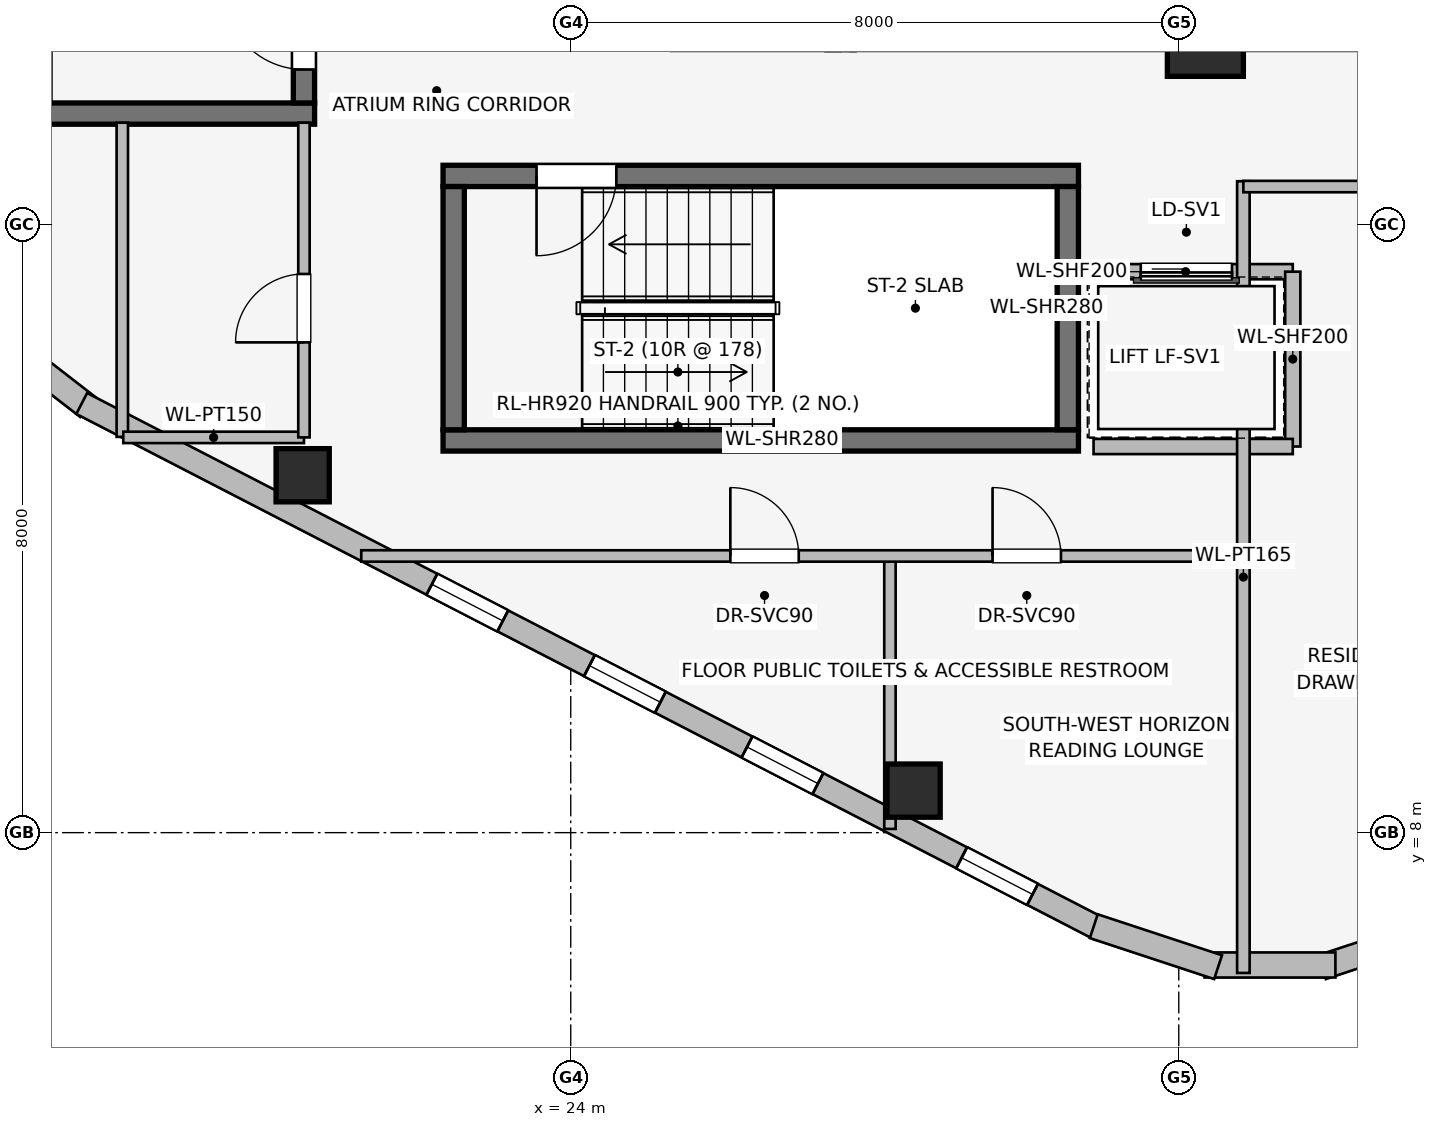
"""IFC4 building model, lengths in metres.
Left out: names, types, materials, properties, quantities, classifications, styles, units other than length and angle.
Written with IfcOpenShell. Run it as: python <this file> out.ifc"""

import sys

from ifc_helpers import new_model, si_unit, direction, frame, frame_2d, origin, origin_2d, place, context, subcontext, project, spatial, rectangle, extrude, element, fill, save


model = new_model("IFC4")
c1 = context("Model", 3, precision=1e-05, world=origin(), true_north=direction((0.0, 1.0)))
c2 = subcontext(c1, "Body", "Model", "MODEL_VIEW")
j1 = project(units=[si_unit("LENGTHUNIT", "METRE"), si_unit("PLANEANGLEUNIT", "RADIAN")], contexts=[c1])
p1 = place(None, origin())
s1 = spatial("IfcSite", under=j1, at=p1, CompositionType="ELEMENT")
p2 = place(p1, origin())
s2 = spatial("IfcBuilding", under=s1, at=p2, CompositionType="ELEMENT")
p3 = place(p2, frame((0.0, 0.0, 249.0)))
s3 = spatial("IfcBuildingStorey", under=s2, at=p3, CompositionType="ELEMENT", Elevation=249.0)
p4 = place(p3, frame((16.87, 17.46, 0.0), z_axis=(0.0, 0.0, 1.0), x_axis=(1.0, 0.0, 0.0)))
e1 = element("IfcWall", 1, at=p4, inside=s3, PredefinedType="SHEAR", context=c2, shape_type="SweptSolid", body=[
    extrude(rectangle(XDim=3.76, YDim=0.28, at=frame_2d((1.88, 0.0))), origin(), (0.0, 0.0, 1.0), 3.55),
])
p5 = place(p3, frame((20.49, 17.6, 0.0), z_axis=(0.0, 0.0, 1.0), x_axis=(0.0, 1.0, 0.0)))
e2 = element("IfcWall", 2, at=p5, inside=s3, PredefinedType="SHEAR", context=c2, shape_type="SweptSolid", body=[
    extrude(rectangle(XDim=7.8, YDim=0.28, at=frame_2d((3.9, 0.0))), origin(), (0.0, 0.0, 1.0), 3.55),
])
p6 = place(p5, frame((0.44, 0.0, 0.0)))
e3 = element("IfcOpeningElement", 3, at=p6, cuts=e2, PredefinedType="OPENING", context=c2, shape_type="SweptSolid", body=[
    extrude(rectangle(XDim=1.05, YDim=2.0, at=frame_2d((0.525, 1.0))), frame((0.0, 0.15, 0.0), z_axis=(0.0, -1.0, 0.0), x_axis=(1.0, 0.0, 0.0)), (0.0, 0.0, 1.0), 0.3),
])
p7 = place(p3, frame((22.32, 13.16, 0.0), z_axis=(0.0, 0.0, 1.0), x_axis=(1.0, 0.0, 0.0)))
e4 = element("IfcWall", 4, at=p7, inside=s3, PredefinedType="SHEAR", context=c2, shape_type="SweptSolid", body=[
    extrude(rectangle(XDim=8.36, YDim=0.28, at=frame_2d((4.18, 0.0))), origin(), (0.0, 0.0, 1.0), 3.55),
])
p8 = place(p3, frame((30.68, 16.64, 0.0), z_axis=(0.0, 0.0, 1.0), x_axis=(-1.0, 0.0, 0.0)))
e5 = element("IfcWall", 5, at=p8, inside=s3, PredefinedType="SHEAR", context=c2, shape_type="SweptSolid", body=[
    extrude(rectangle(XDim=8.36, YDim=0.28, at=frame_2d((4.18, 0.0))), origin(), (0.0, 0.0, 1.0), 3.55),
])
p9 = place(p8, frame((6.08, 0.0, 0.0)))
e6 = element("IfcOpeningElement", 6, at=p9, cuts=e5, PredefinedType="OPENING", context=c2, shape_type="SweptSolid", body=[
    extrude(rectangle(XDim=1.05, YDim=2.0, at=frame_2d((0.525, 1.0))), frame((0.0, 0.15, 0.0), z_axis=(0.0, -1.0, 0.0), x_axis=(1.0, 0.0, 0.0)), (0.0, 0.0, 1.0), 0.3),
])
for number, where, z_axis, x_axis in (
    (7, (22.46, 16.5, 0.0), (0.0, 0.0, 1.0), (0.0, -1.0, 0.0)),
    (8, (30.54, 13.3, 0.0), (0.0, 0.0, 1.0), (0.0, 1.0, 0.0)),
):
    element("IfcWall", number, at=place(p3, frame(where, z_axis=z_axis, x_axis=x_axis)), inside=s3, PredefinedType="SHEAR", context=c2, shape_type="SweptSolid", body=[
        extrude(rectangle(XDim=3.2, YDim=0.28, at=frame_2d((1.6, 0.0))), origin(), (0.0, 0.0, 1.0), 3.55),
    ])
p10 = place(p3, frame((32.35, 18.45, 0.0), z_axis=(0.0, 0.0, 1.0), x_axis=(1.0, 0.0, 0.0)))
e9 = element("IfcColumn", 9, at=p10, inside=s3, PredefinedType="COLUMN", context=c2, shape_type="SweptSolid", body=[
    extrude(rectangle(XDim=1.0, YDim=1.0, at=origin_2d()), origin(), (0.0, 0.0, 1.0), 3.55),
])
for number, where, z_axis, x_axis in (
    (10, (20.473, 12.702, 0.0), (0.0, 0.0, 1.0), (1.0, 0.0, 0.0)),
    (11, (28.511, 8.553, 0.0), (0.0, 0.0, 1.0), (1.0, 0.0, 0.0)),
):
    element("IfcColumn", number, at=place(p3, frame(where, z_axis=z_axis, x_axis=x_axis)), inside=s3, PredefinedType="COLUMN", context=c2, shape_type="SweptSolid", body=[
        extrude(rectangle(XDim=0.7, YDim=0.7, at=origin_2d()), origin(), (0.0, 0.0, 1.0), 3.55),
    ])
p11 = place(p3, frame((17.647, 13.599, 0.0), z_axis=(0.0, 0.0, 1.0), x_axis=(-0.790691856293, 0.61221433207, 0.0)))
e12 = element("IfcWall", 12, at=p11, inside=s3, PredefinedType="STANDARD", context=c2, shape_type="SweptSolid", body=[
    extrude(rectangle(XDim=1.676, YDim=0.33, at=frame_2d((0.838, 0.0))), origin(), (0.0, 0.0, 1.0), 3.29),
])
p12 = place(p3, frame((30.963, 6.73, 0.0), z_axis=(0.0, 0.0, 1.0), x_axis=(-0.888581481622, 0.458718814218, 0.0)))
e13 = element("IfcWall", 13, at=p12, inside=s3, PredefinedType="STANDARD", context=c2, shape_type="SweptSolid", body=[
    extrude(rectangle(XDim=15.077, YDim=0.31, at=frame_2d((7.539, 0.0))), origin(), (0.0, 0.0, 1.0), 3.29),
])
p13 = place(p12, frame((0.998, 0.0, 0.75)))
e14 = element("IfcOpeningElement", 14, at=p13, cuts=e13, PredefinedType="OPENING", context=c2, shape_type="SweptSolid", body=[
    extrude(rectangle(XDim=1.05, YDim=1.4, at=frame_2d((0.525, 0.7))), frame((0.0, 0.165, 0.0), z_axis=(0.0, -1.0, 0.0), x_axis=(1.0, 0.0, 0.0)), (0.0, 0.0, 1.0), 0.33),
])
p14 = place(p12, frame((4.176, 0.0, 0.75)))
e15 = element("IfcOpeningElement", 15, at=p14, cuts=e13, PredefinedType="OPENING", context=c2, shape_type="SweptSolid", body=[
    extrude(rectangle(XDim=1.05, YDim=1.4, at=frame_2d((0.525, 0.7))), frame((0.0, 0.165, 0.0), z_axis=(0.0, -1.0, 0.0), x_axis=(1.0, 0.0, 0.0)), (0.0, 0.0, 1.0), 0.33),
])
p15 = place(p12, frame((6.509, 0.0, 0.75)))
e16 = element("IfcOpeningElement", 16, at=p15, cuts=e13, PredefinedType="OPENING", context=c2, shape_type="SweptSolid", body=[
    extrude(rectangle(XDim=1.05, YDim=1.4, at=frame_2d((0.525, 0.7))), frame((0.0, 0.165, 0.0), z_axis=(0.0, -1.0, 0.0), x_axis=(1.0, 0.0, 0.0)), (0.0, 0.0, 1.0), 0.33),
])
p16 = place(p12, frame((8.842, 0.0, 0.75)))
e17 = element("IfcOpeningElement", 17, at=p16, cuts=e13, PredefinedType="OPENING", context=c2, shape_type="SweptSolid", body=[
    extrude(rectangle(XDim=1.05, YDim=1.4, at=frame_2d((0.525, 0.7))), frame((0.0, 0.165, 0.0), z_axis=(0.0, -1.0, 0.0), x_axis=(1.0, 0.0, 0.0)), (0.0, 0.0, 1.0), 0.33),
])
p17 = place(p3, frame((35.518, 6.769, 0.0), z_axis=(0.0, 0.0, 1.0), x_axis=(-0.949713440491, -0.313120393699, 0.0)))
e18 = element("IfcWall", 18, at=p17, inside=s3, PredefinedType="STANDARD", context=c2, shape_type="SweptSolid", body=[
    extrude(rectangle(XDim=1.722, YDim=0.33, at=frame_2d((0.861, 0.0))), origin(), (0.0, 0.0, 1.0), 3.29),
])
p18 = place(p3, frame((34.061, 6.259, 0.0), z_axis=(0.0, 0.0, 1.0), x_axis=(-1.0, 0.0, 0.0)))
e19 = element("IfcWall", 19, at=p18, inside=s3, PredefinedType="STANDARD", context=c2, shape_type="SweptSolid", body=[
    extrude(rectangle(XDim=1.722, YDim=0.33, at=frame_2d((0.861, 0.0))), origin(), (0.0, 0.0, 1.0), 3.29),
])
p19 = place(p3, frame((32.517, 6.23, 0.0), z_axis=(0.0, 0.0, 1.0), x_axis=(-0.949713440491, 0.313120393699, 0.0)))
e20 = element("IfcWall", 20, at=p19, inside=s3, PredefinedType="STANDARD", context=c2, shape_type="SweptSolid", body=[
    extrude(rectangle(XDim=1.722, YDim=0.33, at=frame_2d((0.861, 0.0))), origin(), (0.0, 0.0, 1.0), 3.29),
])
p20 = place(p3, frame((33.5, 15.38, 0.0), z_axis=(0.0, 0.0, 1.0), x_axis=(-1.0, 0.0, 0.0)))
e21 = element("IfcWall", 21, at=p20, inside=s3, PredefinedType="PARTITIONING", context=c2, shape_type="SweptSolid", body=[
    extrude(rectangle(XDim=2.82, YDim=0.2, at=frame_2d((1.41, 0.0))), origin(), (0.0, 0.0, 1.0), 3.29),
])
p21 = place(p20, frame((0.8, 0.0, 0.0)))
e22 = element("IfcOpeningElement", 22, at=p21, cuts=e21, PredefinedType="OPENING", context=c2, shape_type="SweptSolid", body=[
    extrude(rectangle(XDim=1.2, YDim=2.2, at=frame_2d((0.6, 1.1))), frame((0.0, 0.11, 0.0), z_axis=(0.0, -1.0, 0.0), x_axis=(1.0, 0.0, 0.0)), (0.0, 0.0, 1.0), 0.22),
])
p22 = place(p3, frame((33.5, 13.08, 0.0), z_axis=(0.0, 0.0, 1.0), x_axis=(0.0, 1.0, 0.0)))
e23 = element("IfcWall", 23, at=p22, inside=s3, PredefinedType="PARTITIONING", context=c2, shape_type="SweptSolid", body=[
    extrude(rectangle(XDim=2.3, YDim=0.2, at=frame_2d((1.15, 0.0))), origin(), (0.0, 0.0, 1.0), 3.29),
])
p23 = place(p3, frame((30.879, 13.08, 0.0), z_axis=(0.0, 0.0, 1.0), x_axis=(1.0, 0.0, 0.0)))
e24 = element("IfcWall", 24, at=p23, inside=s3, PredefinedType="PARTITIONING", context=c2, shape_type="SweptSolid", body=[
    extrude(rectangle(XDim=2.621, YDim=0.2, at=frame_2d((1.311, 0.0))), origin(), (0.0, 0.0, 1.0), 3.29),
])
p24 = place(p3, frame((18.1, 17.34, 0.0), z_axis=(0.0, 0.0, 1.0), x_axis=(0.0, -1.0, 0.0)))
e25 = element("IfcWall", 25, at=p24, inside=s3, PredefinedType="PARTITIONING", context=c2, shape_type="SweptSolid", body=[
    extrude(rectangle(XDim=4.133, YDim=0.15, at=frame_2d((2.066, 0.0))), origin(), (0.0, 0.0, 1.0), 3.29),
])
p25 = place(p3, frame((18.113, 13.2, 0.0), z_axis=(0.0, 0.0, 1.0), x_axis=(1.0, 0.0, 0.0)))
e26 = element("IfcWall", 26, at=p25, inside=s3, PredefinedType="PARTITIONING", context=c2, shape_type="SweptSolid", body=[
    extrude(rectangle(XDim=2.377, YDim=0.15, at=frame_2d((1.188, 0.0))), origin(), (0.0, 0.0, 1.0), 3.29),
])
p26 = place(p3, frame((20.49, 13.2, 0.0), z_axis=(0.0, 0.0, 1.0), x_axis=(0.0, 1.0, 0.0)))
e27 = element("IfcWall", 27, at=p26, inside=s3, PredefinedType="PARTITIONING", context=c2, shape_type="SweptSolid", body=[
    extrude(rectangle(XDim=4.14, YDim=0.15, at=frame_2d((2.07, 0.0))), origin(), (0.0, 0.0, 1.0), 3.29),
])
p27 = place(p26, frame((1.25, 0.0, 0.0)))
e28 = element("IfcOpeningElement", 28, at=p27, cuts=e27, PredefinedType="OPENING", context=c2, shape_type="SweptSolid", body=[
    extrude(rectangle(XDim=0.9, YDim=2.0, at=frame_2d((0.45, 1.0))), frame((0.0, 0.085, 0.0), z_axis=(0.0, -1.0, 0.0), x_axis=(1.0, 0.0, 0.0)), (0.0, 0.0, 1.0), 0.17),
])
p28 = place(p3, frame((32.85, 6.154, 0.0), z_axis=(0.0, 0.0, 1.0), x_axis=(0.0, 1.0, 0.0)))
e29 = element("IfcWall", 29, at=p28, inside=s3, PredefinedType="PARTITIONING", context=c2, shape_type="SweptSolid", body=[
    extrude(rectangle(XDim=10.416, YDim=0.165, at=frame_2d((5.208, 0.0))), origin(), (0.0, 0.0, 1.0), 3.29),
])
p29 = place(p3, frame((28.2, 8.049, 0.0), z_axis=(0.0, 0.0, 1.0), x_axis=(0.0, 1.0, 0.0)))
e30 = element("IfcWall", 30, at=p29, inside=s3, PredefinedType="PARTITIONING", context=c2, shape_type="SweptSolid", body=[
    extrude(rectangle(XDim=3.591, YDim=0.15, at=frame_2d((1.795, 0.0))), origin(), (0.0, 0.0, 1.0), 3.29),
])
p30 = place(p3, frame((21.244, 11.64, 0.0), z_axis=(0.0, 0.0, 1.0), x_axis=(1.0, 0.0, 0.0)))
e31 = element("IfcWall", 31, at=p30, inside=s3, PredefinedType="PARTITIONING", context=c2, shape_type="SweptSolid", body=[
    extrude(rectangle(XDim=11.606, YDim=0.15, at=frame_2d((5.803, 0.0))), origin(), (0.0, 0.0, 1.0), 2.833),
])
p31 = place(p30, frame((4.856, 0.0, 0.0)))
e32 = element("IfcOpeningElement", 32, at=p31, cuts=e31, PredefinedType="OPENING", context=c2, shape_type="SweptSolid", body=[
    extrude(rectangle(XDim=0.9, YDim=2.0, at=frame_2d((0.45, 1.0))), frame((0.0, 0.085, 0.0), z_axis=(0.0, -1.0, 0.0), x_axis=(1.0, 0.0, 0.0)), (0.0, 0.0, 1.0), 0.17),
])
p32 = place(p30, frame((8.306, 0.0, 0.0)))
e33 = element("IfcOpeningElement", 33, at=p32, cuts=e31, PredefinedType="OPENING", context=c2, shape_type="SweptSolid", body=[
    extrude(rectangle(XDim=0.9, YDim=2.0, at=frame_2d((0.45, 1.0))), frame((0.0, 0.085, 0.0), z_axis=(0.0, -1.0, 0.0), x_axis=(1.0, 0.0, 0.0)), (0.0, 0.0, 1.0), 0.17),
])
p33 = place(p3, frame((32.85, 16.5, 0.0), z_axis=(0.0, 0.0, 1.0), x_axis=(1.0, 0.0, 0.0)))
e34 = element("IfcWall", 34, at=p33, inside=s3, PredefinedType="PARTITIONING", context=c2, shape_type="SweptSolid", body=[
    extrude(rectangle(XDim=5.061, YDim=0.15, at=frame_2d((2.53, 0.0))), origin(), (0.0, 0.0, 1.0), 3.29),
])
p34 = place(p33, frame((2.051, 0.0, 0.0)))
e35 = element("IfcOpeningElement", 35, at=p34, cuts=e34, PredefinedType="OPENING", context=c2, shape_type="SweptSolid", body=[
    extrude(rectangle(XDim=0.96, YDim=2.0, at=frame_2d((0.48, 1.0))), frame((0.0, 0.085, 0.0), z_axis=(0.0, -1.0, 0.0), x_axis=(1.0, 0.0, 0.0)), (0.0, 0.0, 1.0), 0.17),
])
p35 = place(p13, origin())
e36 = element("IfcWindow", 36, at=p35, inside=s3, PartitioningType="SINGLE_PANEL", PredefinedType="WINDOW", context=c2, shape_type="SweptSolid", body=[
    extrude(rectangle(XDim=1.05, YDim=1.4, at=frame_2d((0.525, 0.7))), frame((0.0, 0.03, 0.0), z_axis=(0.0, -1.0, 0.0), x_axis=(1.0, 0.0, 0.0)), (0.0, 0.0, 1.0), 0.06),
])
fill(e14, e36)
p36 = place(p14, origin())
e37 = element("IfcWindow", 37, at=p36, inside=s3, PartitioningType="SINGLE_PANEL", PredefinedType="WINDOW", context=c2, shape_type="SweptSolid", body=[
    extrude(rectangle(XDim=1.05, YDim=1.4, at=frame_2d((0.525, 0.7))), frame((0.0, 0.03, 0.0), z_axis=(0.0, -1.0, 0.0), x_axis=(1.0, 0.0, 0.0)), (0.0, 0.0, 1.0), 0.06),
])
fill(e15, e37)
p37 = place(p15, origin())
e38 = element("IfcWindow", 38, at=p37, inside=s3, PartitioningType="SINGLE_PANEL", PredefinedType="WINDOW", context=c2, shape_type="SweptSolid", body=[
    extrude(rectangle(XDim=1.05, YDim=1.4, at=frame_2d((0.525, 0.7))), frame((0.0, 0.03, 0.0), z_axis=(0.0, -1.0, 0.0), x_axis=(1.0, 0.0, 0.0)), (0.0, 0.0, 1.0), 0.06),
])
fill(e16, e38)
p38 = place(p16, origin())
e39 = element("IfcWindow", 39, at=p38, inside=s3, PartitioningType="SINGLE_PANEL", PredefinedType="WINDOW", context=c2, shape_type="SweptSolid", body=[
    extrude(rectangle(XDim=1.05, YDim=1.4, at=frame_2d((0.525, 0.7))), frame((0.0, 0.03, 0.0), z_axis=(0.0, -1.0, 0.0), x_axis=(1.0, 0.0, 0.0)), (0.0, 0.0, 1.0), 0.06),
])
fill(e17, e39)
p39 = place(p6, origin())
e40 = element("IfcDoor", 40, at=p39, inside=s3, OperationType="SINGLE_SWING_RIGHT", PredefinedType="DOOR", context=c2, shape_type="SweptSolid", body=[
    extrude(rectangle(XDim=1.05, YDim=2.0, at=frame_2d((0.525, 1.0))), frame((0.0, 0.025, 0.0), z_axis=(0.0, -1.0, 0.0), x_axis=(1.0, 0.0, 0.0)), (0.0, 0.0, 1.0), 0.05),
])
fill(e3, e40)
p40 = place(p9, origin())
e41 = element("IfcDoor", 41, at=p40, inside=s3, OperationType="SINGLE_SWING_RIGHT", PredefinedType="DOOR", context=c2, shape_type="SweptSolid", body=[
    extrude(rectangle(XDim=1.05, YDim=2.0, at=frame_2d((0.525, 1.0))), frame((0.0, 0.025, 0.0), z_axis=(0.0, -1.0, 0.0), x_axis=(1.0, 0.0, 0.0)), (0.0, 0.0, 1.0), 0.05),
])
fill(e6, e41)
p41 = place(p21, origin())
e42 = element("IfcDoor", 42, at=p41, inside=s3, OperationType="SLIDING_TO_RIGHT", PredefinedType="DOOR", context=c2, shape_type="SweptSolid", body=[
    extrude(rectangle(XDim=1.2, YDim=2.2, at=frame_2d((0.6, 1.1))), frame((0.0, 0.025, 0.0), z_axis=(0.0, -1.0, 0.0), x_axis=(1.0, 0.0, 0.0)), (0.0, 0.0, 1.0), 0.05),
])
fill(e22, e42)
p42 = place(p27, origin())
e43 = element("IfcDoor", 43, at=p42, inside=s3, OperationType="SINGLE_SWING_LEFT", PredefinedType="DOOR", context=c2, shape_type="SweptSolid", body=[
    extrude(rectangle(XDim=0.9, YDim=2.0, at=frame_2d((0.45, 1.0))), frame((0.0, 0.025, 0.0), z_axis=(0.0, -1.0, 0.0), x_axis=(1.0, 0.0, 0.0)), (0.0, 0.0, 1.0), 0.05),
])
fill(e28, e43)
p43 = place(p31, origin())
e44 = element("IfcDoor", 44, at=p43, inside=s3, OperationType="SINGLE_SWING_LEFT", PredefinedType="DOOR", context=c2, shape_type="SweptSolid", body=[
    extrude(rectangle(XDim=0.9, YDim=2.0, at=frame_2d((0.45, 1.0))), frame((0.0, 0.025, 0.0), z_axis=(0.0, -1.0, 0.0), x_axis=(1.0, 0.0, 0.0)), (0.0, 0.0, 1.0), 0.05),
])
fill(e32, e44)
p44 = place(p32, origin())
e45 = element("IfcDoor", 45, at=p44, inside=s3, OperationType="SINGLE_SWING_LEFT", PredefinedType="DOOR", context=c2, shape_type="SweptSolid", body=[
    extrude(rectangle(XDim=0.9, YDim=2.0, at=frame_2d((0.45, 1.0))), frame((0.0, 0.025, 0.0), z_axis=(0.0, -1.0, 0.0), x_axis=(1.0, 0.0, 0.0)), (0.0, 0.0, 1.0), 0.05),
])
fill(e33, e45)
save(model, sys.argv[1])
